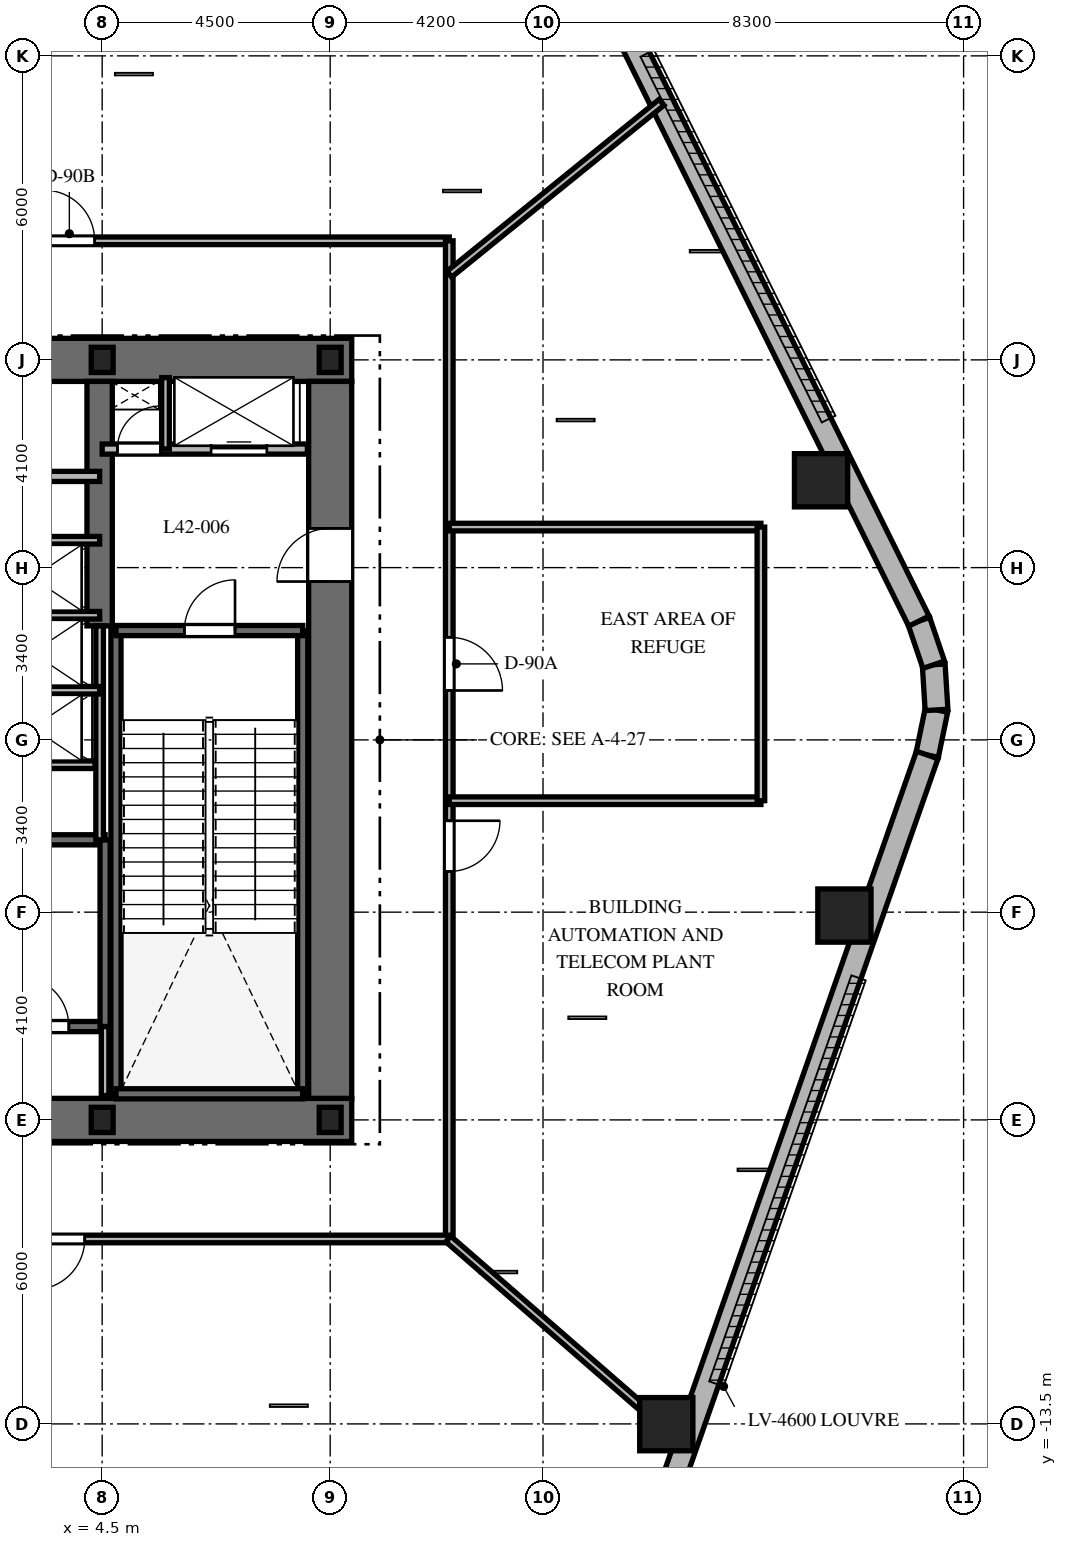
"""IFC4 building model, lengths in metres.
Left out: names, types, materials, properties, quantities, classifications, styles, units other than length and angle.
Written with IfcOpenShell. Run it as: python <this file> out.ifc"""

import sys

from ifc_helpers import new_model, si_unit, direction, frame, frame_2d, origin, origin_2d, place, context, subcontext, project, spatial, rectangle, i_section, extrude, element, fill, save


model = new_model("IFC4")
c1 = context("Model", 3, precision=1e-05, world=origin(), true_north=direction((0.0, 1.0)))
c2 = subcontext(c1, "Body", "Model", "MODEL_VIEW")
j1 = project(units=[si_unit("LENGTHUNIT", "METRE"), si_unit("PLANEANGLEUNIT", "RADIAN")], contexts=[c1])
p1 = place(None, origin())
s1 = spatial("IfcSite", under=j1, at=p1, CompositionType="ELEMENT")
p2 = place(p1, origin())
s2 = spatial("IfcBuilding", under=s1, at=p2, CompositionType="ELEMENT")
p3 = place(p2, frame((0.0, 0.0, 170.2)))
s3 = spatial("IfcBuildingStorey", under=s2, at=p3, CompositionType="ELEMENT", Elevation=170.2)
p4 = place(p3, frame((-9.425, -7.5, 0.0), z_axis=(0.0, 0.0, 1.0), x_axis=(1.0, 0.0, 0.0)))
e1 = element("IfcWall", 1, at=p4, inside=s3, PredefinedType="SHEAR", context=c2, shape_type="SweptSolid", body=[
    extrude(rectangle(XDim=18.85, YDim=0.85, at=frame_2d((9.425, 0.0))), origin(), (0.0, 0.0, 1.0), 5.4),
])
p5 = place(p4, frame((9.475, 0.0, 0.0)))
e2 = element("IfcOpeningElement", 2, at=p5, cuts=e1, PredefinedType="OPENING", context=c2, shape_type="SweptSolid", body=[
    extrude(rectangle(XDim=1.0, YDim=2.15, at=frame_2d((0.5, 1.075))), frame((0.0, 0.435, 0.0), z_axis=(0.0, -1.0, 0.0), x_axis=(1.0, 0.0, 0.0)), (0.0, 0.0, 1.0), 0.87),
])
p6 = place(p3, frame((1.85, 7.5, 0.0), z_axis=(0.0, 0.0, 1.0), x_axis=(1.0, 0.0, 0.0)))
e3 = element("IfcWall", 3, at=p6, inside=s3, PredefinedType="SHEAR", context=c2, shape_type="SweptSolid", body=[
    extrude(rectangle(XDim=7.575, YDim=0.85, at=frame_2d((3.788, 0.0))), origin(), (0.0, 0.0, 1.0), 5.4),
])
p7 = place(p3, frame((9.0, -7.075, 0.0), z_axis=(0.0, 0.0, 1.0), x_axis=(0.0, 1.0, 0.0)))
e4 = element("IfcWall", 4, at=p7, inside=s3, PredefinedType="SHEAR", context=c2, shape_type="SweptSolid", body=[
    extrude(rectangle(XDim=14.15, YDim=0.85, at=frame_2d((7.075, 0.0))), origin(), (0.0, 0.0, 1.0), 5.4),
])
p8 = place(p7, frame((10.2, 0.0, 0.0)))
e5 = element("IfcOpeningElement", 5, at=p8, cuts=e4, PredefinedType="OPENING", context=c2, shape_type="SweptSolid", body=[
    extrude(rectangle(XDim=1.05, YDim=2.15, at=frame_2d((0.525, 1.075))), frame((0.0, 0.435, 0.0), z_axis=(0.0, -1.0, 0.0), x_axis=(1.0, 0.0, 0.0)), (0.0, 0.0, 1.0), 0.87),
])
p9 = place(p3, frame((4.45, 2.25, 0.0), z_axis=(0.0, 0.0, 1.0), x_axis=(0.0, 1.0, 0.0)))
e6 = element("IfcWall", 6, at=p9, inside=s3, PredefinedType="SHEAR", context=c2, shape_type="SweptSolid", body=[
    extrude(rectangle(XDim=4.825, YDim=0.5, at=frame_2d((2.413, 0.0))), origin(), (0.0, 0.0, 1.0), 5.4),
])
for number, where, z_axis, x_axis in (
    (7, (4.772, -6.985, 0.0), (0.0, 0.0, 1.0), (0.0, 1.0, 0.0)),
    (8, (8.458, -6.985, 0.0), (0.0, 0.0, 1.0), (0.0, 1.0, 0.0)),
):
    element("IfcWall", number, at=place(p3, frame(where, z_axis=z_axis, x_axis=x_axis)), inside=s3, PredefinedType="SHEAR", context=c2, shape_type="SweptSolid", body=[
        extrude(rectangle(XDim=9.143, YDim=0.2, at=frame_2d((4.572, 0.0))), origin(), (0.0, 0.0, 1.0), 5.4),
    ])
p10 = place(p3, frame((4.772, -6.985, 0.0), z_axis=(0.0, 0.0, 1.0), x_axis=(1.0, 0.0, 0.0)))
e9 = element("IfcWall", 9, at=p10, inside=s3, PredefinedType="SHEAR", context=c2, shape_type="SweptSolid", body=[
    extrude(rectangle(XDim=3.686, YDim=0.2, at=frame_2d((1.843, 0.0))), origin(), (0.0, 0.0, 1.0), 5.4),
])
p11 = place(p3, frame((4.772, 2.158, 0.0), z_axis=(0.0, 0.0, 1.0), x_axis=(1.0, 0.0, 0.0)))
e10 = element("IfcWall", 10, at=p11, inside=s3, PredefinedType="SHEAR", context=c2, shape_type="SweptSolid", body=[
    extrude(rectangle(XDim=3.686, YDim=0.2, at=frame_2d((1.843, 0.0))), origin(), (0.0, 0.0, 1.0), 5.4),
])
p12 = place(p11, frame((1.35, 0.0, 0.0)))
e11 = element("IfcOpeningElement", 11, at=p12, cuts=e10, PredefinedType="OPENING", context=c2, shape_type="SweptSolid", body=[
    extrude(rectangle(XDim=1.0, YDim=2.15, at=frame_2d((0.5, 1.075))), frame((0.0, 0.11, 0.0), z_axis=(0.0, -1.0, 0.0), x_axis=(1.0, 0.0, 0.0)), (0.0, 0.0, 1.0), 0.22),
])
p13 = place(p3, frame((-4.608, -5.658, 0.0), z_axis=(0.0, 0.0, 1.0), x_axis=(1.0, 0.0, 0.0)))
e12 = element("IfcWall", 12, at=p13, inside=s3, PredefinedType="SHEAR", context=c2, shape_type="SweptSolid", body=[
    extrude(rectangle(XDim=9.166, YDim=0.2, at=frame_2d((4.583, 0.0))), origin(), (0.0, 0.0, 1.0), 5.4),
])
p14 = place(p13, frame((7.45, 0.0, 0.0)))
e13 = element("IfcOpeningElement", 13, at=p14, cuts=e12, PredefinedType="OPENING", context=c2, shape_type="SweptSolid", body=[
    extrude(rectangle(XDim=1.0, YDim=2.15, at=frame_2d((0.5, 1.075))), frame((0.0, 0.11, 0.0), z_axis=(0.0, -1.0, 0.0), x_axis=(1.0, 0.0, 0.0)), (0.0, 0.0, 1.0), 0.22),
])
p15 = place(p3, frame((-4.608, -1.972, 0.0), z_axis=(0.0, 0.0, 1.0), x_axis=(1.0, 0.0, 0.0)))
e14 = element("IfcWall", 14, at=p15, inside=s3, PredefinedType="SHEAR", context=c2, shape_type="SweptSolid", body=[
    extrude(rectangle(XDim=9.166, YDim=0.2, at=frame_2d((4.583, 0.0))), origin(), (0.0, 0.0, 1.0), 5.4),
])
p16 = place(p3, frame((4.558, -5.658, 0.0), z_axis=(0.0, 0.0, 1.0), x_axis=(0.0, 1.0, 0.0)))
e15 = element("IfcWall", 15, at=p16, inside=s3, PredefinedType="SHEAR", context=c2, shape_type="SweptSolid", body=[
    extrude(rectangle(XDim=3.686, YDim=0.2, at=frame_2d((1.843, 0.0))), origin(), (0.0, 0.0, 1.0), 5.4),
])
for number, where, z_axis, x_axis in (
    (16, (4.5, -7.5, 0.0), (0.0, 0.0, 1.0), (1.0, 0.0, 0.0)),
    (17, (9.0, -7.5, 0.0), (0.0, 0.0, 1.0), (1.0, 0.0, 0.0)),
    (18, (9.0, 7.5, 0.0), (0.0, 0.0, 1.0), (1.0, 0.0, 0.0)),
    (19, (4.5, 7.5, 0.0), (0.0, 0.0, 1.0), (1.0, 0.0, 0.0)),
):
    element("IfcColumn", number, at=place(p3, frame(where, z_axis=z_axis, x_axis=x_axis)), inside=s3, PredefinedType="COLUMN", context=c2, shape_type="SweptSolid", body=[
        extrude(i_section(OverallWidth=0.432, OverallDepth=0.498, WebThickness=0.056, FlangeThickness=0.089, at=origin_2d()), origin(), (0.0, 0.0, 1.0), 5.4),
    ])
for number, where, z_axis, x_axis in (
    (20, (15.633, -13.505, 0.0), (0.0, 0.0, 1.0), (1.0, 0.0, 0.0)),
    (21, (19.148, -3.467, 0.0), (0.0, 0.0, 1.0), (1.0, 0.0, 0.0)),
    (22, (18.687, 5.124, 0.0), (0.0, 0.0, 1.0), (1.0, 0.0, 0.0)),
):
    element("IfcColumn", number, at=place(p3, frame(where, z_axis=z_axis, x_axis=x_axis)), inside=s3, PredefinedType="COLUMN", context=c2, shape_type="SweptSolid", body=[
        extrude(rectangle(XDim=1.05, YDim=1.05, at=origin_2d()), origin(), (0.0, 0.0, 1.0), 5.4),
    ])
p17 = place(p3, frame((20.782, -0.298, 0.0), z_axis=(0.0, 0.0, 1.0), x_axis=(0.202570068411, 0.979267771033, 0.0)))
e23 = element("IfcWall", 23, at=p17, inside=s3, PredefinedType="SOLIDWALL", context=c2, shape_type="SweptSolid", body=[
    extrude(rectangle(XDim=0.909, YDim=0.45, at=frame_2d((0.454, 0.0))), origin(), (0.0, 0.0, 1.0), 5.1),
])
p18 = place(p3, frame((20.966, 0.592, 0.0), z_axis=(0.0, 0.0, 1.0), x_axis=(-0.061748898935, 0.998091715966, 0.0)))
e24 = element("IfcWall", 24, at=p18, inside=s3, PredefinedType="SOLIDWALL", context=c2, shape_type="SweptSolid", body=[
    extrude(rectangle(XDim=0.894, YDim=0.45, at=frame_2d((0.447, 0.0))), origin(), (0.0, 0.0, 1.0), 5.1),
])
p19 = place(p3, frame((20.911, 1.484, 0.0), z_axis=(0.0, 0.0, 1.0), x_axis=(-0.321623334353, 0.946867694453, 0.0)))
e25 = element("IfcWall", 25, at=p19, inside=s3, PredefinedType="SOLIDWALL", context=c2, shape_type="SweptSolid", body=[
    extrude(rectangle(XDim=0.909, YDim=0.45, at=frame_2d((0.454, 0.0))), origin(), (0.0, 0.0, 1.0), 5.1),
])
p20 = place(p3, frame((14.937, -16.993, 0.0), z_axis=(0.0, 0.0, 1.0), x_axis=(0.330431575061, 0.943829949834, 0.0)))
e26 = element("IfcWall", 26, at=p20, inside=s3, PredefinedType="SOLIDWALL", context=c2, shape_type="SweptSolid", body=[
    extrude(rectangle(XDim=17.689, YDim=0.45, at=frame_2d((8.844, 0.0))), origin(), (0.0, 0.0, 1.0), 5.1),
])
p21 = place(p3, frame((20.618, 2.344, 0.0), z_axis=(0.0, 0.0, 1.0), x_axis=(-0.444243691097, 0.895905990002, 0.0)))
e27 = element("IfcWall", 27, at=p21, inside=s3, PredefinedType="SOLIDWALL", context=c2, shape_type="SweptSolid", body=[
    extrude(rectangle(XDim=16.784, YDim=0.45, at=frame_2d((8.392, 0.0))), origin(), (0.0, 0.0, 1.0), 5.1),
])
p22 = place(p3, frame((4.558, -7.02, 0.0), z_axis=(0.0, 0.0, 1.0), x_axis=(0.0, 1.0, 0.0)))
e28 = element("IfcWall", 28, at=p22, inside=s3, PredefinedType="PARTITIONING", context=c2, shape_type="SweptSolid", body=[
    extrude(rectangle(XDim=1.362, YDim=0.15, at=frame_2d((0.681, 0.0))), origin(), (0.0, 0.0, 1.0), 5.1),
])
p23 = place(p3, frame((4.5, 5.74, 0.0), z_axis=(0.0, 0.0, 1.0), x_axis=(1.0, 0.0, 0.0)))
e29 = element("IfcWall", 29, at=p23, inside=s3, PredefinedType="PARTITIONING", context=c2, shape_type="SweptSolid", body=[
    extrude(rectangle(XDim=4.05, YDim=0.2, at=frame_2d((2.025, 0.0))), origin(), (0.0, 0.0, 1.0), 5.1),
])
p24 = place(p23, frame((0.3, 0.0, 0.0)))
e30 = element("IfcOpeningElement", 30, at=p24, cuts=e29, PredefinedType="OPENING", context=c2, shape_type="SweptSolid", body=[
    extrude(rectangle(XDim=0.85, YDim=2.03, at=frame_2d((0.425, 1.015))), frame((0.0, 0.11, 0.0), z_axis=(0.0, -1.0, 0.0), x_axis=(1.0, 0.0, 0.0)), (0.0, 0.0, 1.0), 0.22),
])
p25 = place(p23, frame((2.15, 0.0, 0.0)))
e31 = element("IfcOpeningElement", 31, at=p25, cuts=e29, PredefinedType="OPENING", context=c2, shape_type="SweptSolid", body=[
    extrude(rectangle(XDim=1.1, YDim=2.2, at=frame_2d((0.55, 1.1))), frame((0.0, 0.11, 0.0), z_axis=(0.0, -1.0, 0.0), x_axis=(1.0, 0.0, 0.0)), (0.0, 0.0, 1.0), 0.22),
])
p26 = place(p3, frame((5.75, 5.74, 0.0), z_axis=(0.0, 0.0, 1.0), x_axis=(0.0, 1.0, 0.0)))
e32 = element("IfcWall", 32, at=p26, inside=s3, PredefinedType="PARTITIONING", context=c2, shape_type="SweptSolid", body=[
    extrude(rectangle(XDim=1.41, YDim=0.15, at=frame_2d((0.705, 0.0))), origin(), (0.0, 0.0, 1.0), 5.1),
])
p27 = place(p3, frame((1.85, 5.2, 0.0), z_axis=(0.0, 0.0, 1.0), x_axis=(1.0, 0.0, 0.0)))
e33 = element("IfcWall", 33, at=p27, inside=s3, PredefinedType="PARTITIONING", context=c2, shape_type="SweptSolid", body=[
    extrude(rectangle(XDim=2.6, YDim=0.2, at=frame_2d((1.3, 0.0))), origin(), (0.0, 0.0, 1.0), 5.1),
])
p28 = place(p3, frame((4.45, -1.972, 0.0), z_axis=(0.0, 0.0, 1.0), x_axis=(0.0, 1.0, 0.0)))
e34 = element("IfcWall", 34, at=p28, inside=s3, PredefinedType="PARTITIONING", context=c2, shape_type="SweptSolid", body=[
    extrude(rectangle(XDim=4.222, YDim=0.15, at=frame_2d((2.111, 0.0))), origin(), (0.0, 0.0, 1.0), 5.1),
])
for number, where, z_axis, x_axis in (
    (35, (1.9, 3.94, 0.0), (0.0, 0.0, 1.0), (1.0, 0.0, 0.0)),
    (36, (1.9, 0.98, 0.0), (0.0, 0.0, 1.0), (1.0, 0.0, 0.0)),
    (37, (1.9, 2.46, 0.0), (0.0, 0.0, 1.0), (1.0, 0.0, 0.0)),
):
    element("IfcWall", number, at=place(p3, frame(where, z_axis=z_axis, x_axis=x_axis)), inside=s3, PredefinedType="PARTITIONING", context=c2, shape_type="SweptSolid", body=[
        extrude(rectangle(XDim=2.55, YDim=0.15, at=frame_2d((1.275, 0.0))), origin(), (0.0, 0.0, 1.0), 5.1),
    ])
p29 = place(p3, frame((-4.36, -0.49, 0.0), z_axis=(0.0, 0.0, 1.0), x_axis=(1.0, 0.0, 0.0)))
e38 = element("IfcWall", 38, at=p29, inside=s3, PredefinedType="PARTITIONING", context=c2, shape_type="SweptSolid", body=[
    extrude(rectangle(XDim=8.72, YDim=0.15, at=frame_2d((4.36, 0.0))), origin(), (0.0, 0.0, 1.0), 5.1),
])
p30 = place(p29, frame((3.86, 0.0, 0.0)))
e39 = element("IfcOpeningElement", 39, at=p30, cuts=e38, PredefinedType="OPENING", context=c2, shape_type="SweptSolid", body=[
    extrude(rectangle(XDim=0.9, YDim=2.03, at=frame_2d((0.45, 1.015))), frame((0.0, 0.085, 0.0), z_axis=(0.0, -1.0, 0.0), x_axis=(1.0, 0.0, 0.0)), (0.0, 0.0, 1.0), 0.17),
])
p31 = place(p3, frame((-11.35, 9.85, 0.0), z_axis=(0.0, 0.0, 1.0), x_axis=(1.0, 0.0, 0.0)))
e40 = element("IfcWall", 40, at=p31, inside=s3, PredefinedType="PARTITIONING", context=c2, shape_type="SweptSolid", body=[
    extrude(rectangle(XDim=22.7, YDim=0.15, at=frame_2d((11.35, 0.0))), origin(), (0.0, 0.0, 1.0), 4.316),
])
p32 = place(p31, frame((14.702, 0.0, 0.0)))
e41 = element("IfcOpeningElement", 41, at=p32, cuts=e40, PredefinedType="OPENING", context=c2, shape_type="SweptSolid", body=[
    extrude(rectangle(XDim=1.0, YDim=2.15, at=frame_2d((0.5, 1.075))), frame((0.0, 0.085, 0.0), z_axis=(0.0, -1.0, 0.0), x_axis=(1.0, 0.0, 0.0)), (0.0, 0.0, 1.0), 0.17),
])
p33 = place(p3, frame((11.35, 9.85, 0.0), z_axis=(0.0, 0.0, 1.0), x_axis=(0.0, -1.0, 0.0)))
e42 = element("IfcWall", 42, at=p33, inside=s3, PredefinedType="PARTITIONING", context=c2, shape_type="SweptSolid", body=[
    extrude(rectangle(XDim=19.7, YDim=0.15, at=frame_2d((9.85, 0.0))), origin(), (0.0, 0.0, 1.0), 4.316),
])
p34 = place(p33, frame((7.825, 0.0, 0.0)))
e43 = element("IfcOpeningElement", 43, at=p34, cuts=e42, PredefinedType="OPENING", context=c2, shape_type="SweptSolid", body=[
    extrude(rectangle(XDim=1.05, YDim=2.15, at=frame_2d((0.525, 1.075))), frame((0.0, 0.085, 0.0), z_axis=(0.0, -1.0, 0.0), x_axis=(1.0, 0.0, 0.0)), (0.0, 0.0, 1.0), 0.17),
])
p35 = place(p33, frame((11.446, 0.0, 0.0)))
e44 = element("IfcOpeningElement", 44, at=p35, cuts=e42, PredefinedType="OPENING", context=c2, shape_type="SweptSolid", body=[
    extrude(rectangle(XDim=1.0, YDim=2.15, at=frame_2d((0.5, 1.075))), frame((0.0, 0.085, 0.0), z_axis=(0.0, -1.0, 0.0), x_axis=(1.0, 0.0, 0.0)), (0.0, 0.0, 1.0), 0.17),
])
p36 = place(p3, frame((11.35, -9.85, 0.0), z_axis=(0.0, 0.0, 1.0), x_axis=(-1.0, 0.0, 0.0)))
e45 = element("IfcWall", 45, at=p36, inside=s3, PredefinedType="PARTITIONING", context=c2, shape_type="SweptSolid", body=[
    extrude(rectangle(XDim=22.7, YDim=0.15, at=frame_2d((11.35, 0.0))), origin(), (0.0, 0.0, 1.0), 4.316),
])
p37 = place(p36, frame((7.194, 0.0, 0.0)))
e46 = element("IfcOpeningElement", 46, at=p37, cuts=e45, PredefinedType="OPENING", context=c2, shape_type="SweptSolid", body=[
    extrude(rectangle(XDim=1.0, YDim=2.15, at=frame_2d((0.5, 1.075))), frame((0.0, 0.085, 0.0), z_axis=(0.0, -1.0, 0.0), x_axis=(1.0, 0.0, 0.0)), (0.0, 0.0, 1.0), 0.17),
])
for number, where, z_axis, x_axis in (
    (47, (11.35, -1.2, 0.0), (0.0, 0.0, 1.0), (1.0, 0.0, 0.0)),
    (48, (11.35, 4.2, 0.0), (0.0, 0.0, 1.0), (1.0, 0.0, 0.0)),
):
    element("IfcWall", number, at=place(p3, frame(where, z_axis=z_axis, x_axis=x_axis)), inside=s3, PredefinedType="PARTITIONING", context=c2, shape_type="SweptSolid", body=[
        extrude(rectangle(XDim=6.15, YDim=0.15, at=frame_2d((3.075, 0.0))), origin(), (0.0, 0.0, 1.0), 4.541),
    ])
p38 = place(p3, frame((17.5, -1.2, 0.0), z_axis=(0.0, 0.0, 1.0), x_axis=(0.0, 1.0, 0.0)))
e49 = element("IfcWall", 49, at=p38, inside=s3, PredefinedType="PARTITIONING", context=c2, shape_type="SweptSolid", body=[
    extrude(rectangle(XDim=5.4, YDim=0.15, at=frame_2d((2.7, 0.0))), origin(), (0.0, 0.0, 1.0), 5.1),
])
p39 = place(p3, frame((11.35, 9.191, 0.0), z_axis=(0.0, 0.0, 1.0), x_axis=(0.777126765843, 0.62934409492, 0.0)))
e50 = element("IfcWall", 50, at=p39, inside=s3, PredefinedType="PARTITIONING", context=c2, shape_type="SweptSolid", body=[
    extrude(rectangle(XDim=5.392, YDim=0.15, at=frame_2d((2.696, 0.0))), origin(), (0.0, 0.0, 1.0), 4.34),
])
p40 = place(p3, frame((11.331, -9.85, 0.0), z_axis=(0.0, 0.0, 1.0), x_axis=(0.754718202942, -0.656049109555, 0.0)))
e51 = element("IfcWall", 51, at=p40, inside=s3, PredefinedType="PARTITIONING", context=c2, shape_type="SweptSolid", body=[
    extrude(rectangle(XDim=6.203, YDim=0.15, at=frame_2d((3.102, 0.0))), origin(), (0.0, 0.0, 1.0), 4.34),
])
p41 = place(p12, origin())
e52 = element("IfcDoor", 52, at=p41, inside=s3, OperationType="SINGLE_SWING_RIGHT", PredefinedType="DOOR", context=c2, shape_type="SweptSolid", body=[
    extrude(rectangle(XDim=1.0, YDim=2.15, at=frame_2d((0.5, 1.075))), frame((0.0, 0.025, 0.0), z_axis=(0.0, -1.0, 0.0), x_axis=(1.0, 0.0, 0.0)), (0.0, 0.0, 1.0), 0.05),
])
fill(e11, e52)
p42 = place(p14, origin())
e53 = element("IfcDoor", 53, at=p42, inside=s3, OperationType="SINGLE_SWING_LEFT", PredefinedType="DOOR", context=c2, shape_type="SweptSolid", body=[
    extrude(rectangle(XDim=1.0, YDim=2.15, at=frame_2d((0.5, 1.075))), frame((0.0, 0.025, 0.0), z_axis=(0.0, -1.0, 0.0), x_axis=(1.0, 0.0, 0.0)), (0.0, 0.0, 1.0), 0.05),
])
fill(e13, e53)
p43 = place(p8, origin())
e54 = element("IfcDoor", 54, at=p43, inside=s3, OperationType="SINGLE_SWING_LEFT", PredefinedType="DOOR", context=c2, shape_type="SweptSolid", body=[
    extrude(rectangle(XDim=1.05, YDim=2.15, at=frame_2d((0.525, 1.075))), frame((0.0, 0.025, 0.0), z_axis=(0.0, -1.0, 0.0), x_axis=(1.0, 0.0, 0.0)), (0.0, 0.0, 1.0), 0.05),
])
fill(e5, e54)
p44 = place(p24, origin())
e55 = element("IfcDoor", 55, at=p44, inside=s3, OperationType="SINGLE_SWING_RIGHT", PredefinedType="DOOR", context=c2, shape_type="SweptSolid", body=[
    extrude(rectangle(XDim=0.85, YDim=2.03, at=frame_2d((0.425, 1.015))), frame((0.0, 0.025, 0.0), z_axis=(0.0, -1.0, 0.0), x_axis=(1.0, 0.0, 0.0)), (0.0, 0.0, 1.0), 0.05),
])
fill(e30, e55)
p45 = place(p25, origin())
e56 = element("IfcDoor", 56, at=p45, inside=s3, OperationType="SLIDING_TO_RIGHT", PredefinedType="DOOR", context=c2, shape_type="SweptSolid", body=[
    extrude(rectangle(XDim=1.1, YDim=2.2, at=frame_2d((0.55, 1.1))), frame((0.0, 0.025, 0.0), z_axis=(0.0, -1.0, 0.0), x_axis=(1.0, 0.0, 0.0)), (0.0, 0.0, 1.0), 0.05),
])
fill(e31, e56)
p46 = place(p34, origin())
e57 = element("IfcDoor", 57, at=p46, inside=s3, OperationType="SINGLE_SWING_RIGHT", PredefinedType="DOOR", context=c2, shape_type="SweptSolid", body=[
    extrude(rectangle(XDim=1.05, YDim=2.15, at=frame_2d((0.525, 1.075))), frame((0.0, 0.025, 0.0), z_axis=(0.0, -1.0, 0.0), x_axis=(1.0, 0.0, 0.0)), (0.0, 0.0, 1.0), 0.05),
])
fill(e43, e57)
p47 = place(p32, origin())
e58 = element("IfcDoor", 58, at=p47, inside=s3, OperationType="SINGLE_SWING_LEFT", PredefinedType="DOOR", context=c2, shape_type="SweptSolid", body=[
    extrude(rectangle(XDim=1.0, YDim=2.15, at=frame_2d((0.5, 1.075))), frame((0.0, 0.025, 0.0), z_axis=(0.0, -1.0, 0.0), x_axis=(1.0, 0.0, 0.0)), (0.0, 0.0, 1.0), 0.05),
])
fill(e41, e58)
p48 = place(p37, origin())
e59 = element("IfcDoor", 59, at=p48, inside=s3, OperationType="SINGLE_SWING_RIGHT", PredefinedType="DOOR", context=c2, shape_type="SweptSolid", body=[
    extrude(rectangle(XDim=1.0, YDim=2.15, at=frame_2d((0.5, 1.075))), frame((0.0, 0.025, 0.0), z_axis=(0.0, -1.0, 0.0), x_axis=(1.0, 0.0, 0.0)), (0.0, 0.0, 1.0), 0.05),
])
fill(e46, e59)
p49 = place(p35, origin())
e60 = element("IfcDoor", 60, at=p49, inside=s3, OperationType="SINGLE_SWING_LEFT", PredefinedType="DOOR", context=c2, shape_type="SweptSolid", body=[
    extrude(rectangle(XDim=1.0, YDim=2.15, at=frame_2d((0.5, 1.075))), frame((0.0, 0.025, 0.0), z_axis=(0.0, -1.0, 0.0), x_axis=(1.0, 0.0, 0.0)), (0.0, 0.0, 1.0), 0.05),
])
fill(e44, e60)
save(model, sys.argv[1])
